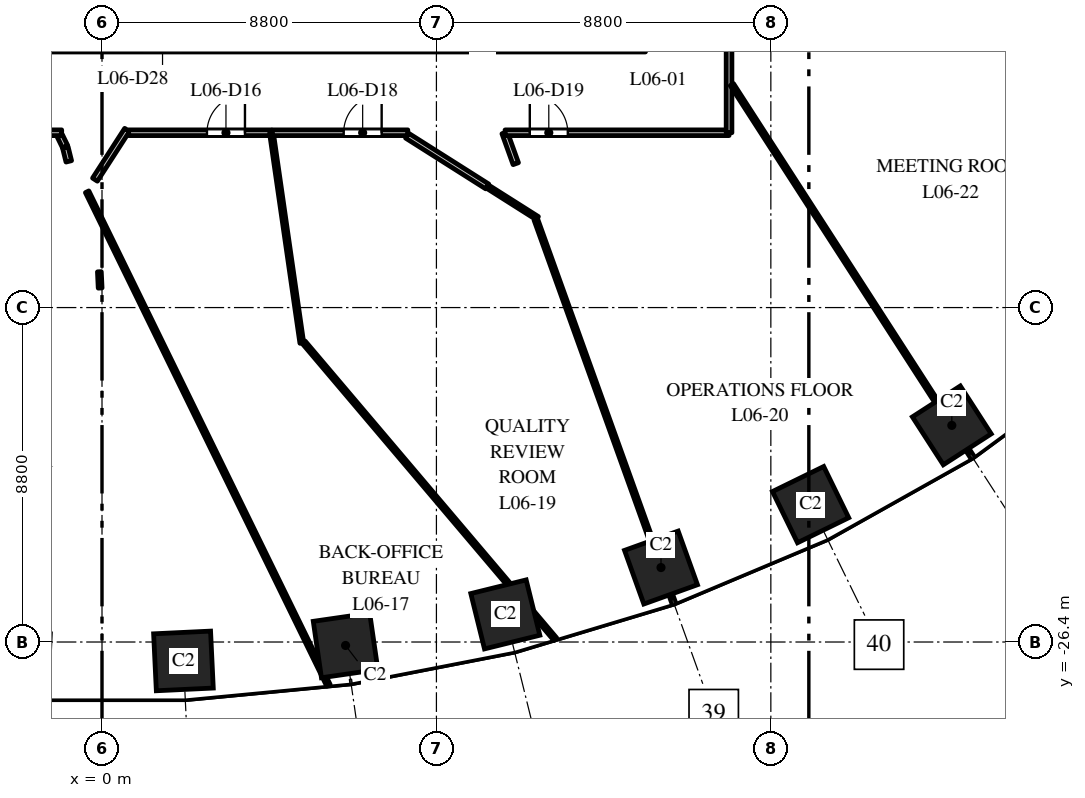
"""IFC4 building model, lengths in metres.
Left out: names, types, materials, properties, quantities, classifications, styles, units other than length and angle.
Written with IfcOpenShell. Run it as: python <this file> out.ifc"""

import sys

from ifc_helpers import new_model, si_unit, direction, frame, frame_2d, origin, origin_2d, place, context, subcontext, project, spatial, rectangle, extrude, element, fill, save


model = new_model("IFC4")
c1 = context("Model", 3, precision=1e-05, world=origin(), true_north=direction((0.0, 1.0)))
c2 = subcontext(c1, "Body", "Model", "MODEL_VIEW")
j1 = project(units=[si_unit("LENGTHUNIT", "METRE"), si_unit("PLANEANGLEUNIT", "RADIAN")], contexts=[c1])
p1 = place(None, origin())
s1 = spatial("IfcSite", under=j1, at=p1, CompositionType="ELEMENT")
p2 = place(p1, origin())
s2 = spatial("IfcBuilding", under=s1, at=p2, CompositionType="ELEMENT")
p3 = place(p2, frame((0.0, 0.0, 34.5)))
s3 = spatial("IfcBuildingStorey", under=s2, at=p3, CompositionType="ELEMENT", Elevation=34.5)
for number, where, z_axis, x_axis in (
    (1, (2.143, -26.898, 0.0), (0.0, 0.0, 1.0), (0.999, 0.048, 0.0)),
    (2, (6.409, -26.491, 0.0), (0.0, 0.0, 1.0), (0.99, 0.143, 0.0)),
    (3, (10.613, -25.674, 0.0), (0.0, 0.0, 1.0), (0.971, 0.24, 0.0)),
    (4, (14.709, -24.441, 0.0), (0.0, 0.0, 1.0), (0.941, 0.338, 0.0)),
    (5, (18.646, -22.785, 0.0), (0.0, 0.0, 1.0), (0.898, 0.439, 0.0)),
    (6, (22.362, -20.7, 0.0), (0.0, 0.0, 1.0), (0.84, 0.542, 0.0)),
):
    element("IfcColumn", number, at=place(p3, frame(where, z_axis=z_axis, x_axis=x_axis)), inside=s3, PredefinedType="COLUMN", context=c2, shape_type="SweptSolid", body=[
        extrude(rectangle(XDim=1.5, YDim=1.5, at=origin_2d()), origin(), (0.0, 0.0, 1.0), 4.0),
    ])
p4 = place(p3, frame((-14.3, -10.8, 0.0), z_axis=(0.0, 0.0, 1.0), x_axis=(1.0, 0.0, 0.0)))
e7 = element("IfcWall", 7, at=p4, inside=s3, PredefinedType="PARTITIONING", context=c2, shape_type="SweptSolid", body=[
    extrude(rectangle(XDim=28.6, YDim=0.15, at=frame_2d((14.3, 0.0))), origin(), (0.0, 0.0, 1.0), 2.85),
])
p5 = place(p4, frame((10.627, 0.0, 0.0)))
e8 = element("IfcOpeningElement", 8, at=p5, cuts=e7, PredefinedType="OPENING", context=c2, shape_type="SweptSolid", body=[
    extrude(rectangle(XDim=1.0, YDim=2.1, at=frame_2d((0.5, 1.05))), frame((0.0, 0.085, 0.0), z_axis=(0.0, -1.0, 0.0), x_axis=(1.0, 0.0, 0.0)), (0.0, 0.0, 1.0), 0.17),
])
p6 = place(p4, frame((15.393, 0.0, 0.0)))
e9 = element("IfcOpeningElement", 9, at=p6, cuts=e7, PredefinedType="OPENING", context=c2, shape_type="SweptSolid", body=[
    extrude(rectangle(XDim=1.0, YDim=2.1, at=frame_2d((0.5, 1.05))), frame((0.0, 0.085, 0.0), z_axis=(0.0, -1.0, 0.0), x_axis=(1.0, 0.0, 0.0)), (0.0, 0.0, 1.0), 0.17),
])
p7 = place(p3, frame((-7.483, -13.0, 0.0), z_axis=(0.0, 0.0, 1.0), x_axis=(1.0, 0.0, 0.0)))
e10 = element("IfcWall", 10, at=p7, inside=s3, PredefinedType="PARTITIONING", context=c2, shape_type="SweptSolid", body=[
    extrude(rectangle(XDim=6.422, YDim=0.15, at=frame_2d((3.211, 0.0))), origin(), (0.0, 0.0, 1.0), 2.85),
])
p8 = place(p7, frame((0.634, 0.0, 0.0)))
e11 = element("IfcOpeningElement", 11, at=p8, cuts=e10, PredefinedType="OPENING", context=c2, shape_type="SweptSolid", body=[
    extrude(rectangle(XDim=1.0, YDim=2.1, at=frame_2d((0.5, 1.05))), frame((0.0, 0.085, 0.0), z_axis=(0.0, -1.0, 0.0), x_axis=(1.0, 0.0, 0.0)), (0.0, 0.0, 1.0), 0.17),
])
p9 = place(p3, frame((-1.111, -13.079, 0.0), z_axis=(0.0, 0.0, 1.0), x_axis=(0.440240923942, -0.897879685084, 0.0)))
e12 = element("IfcWall", 12, at=p9, inside=s3, PredefinedType="PARTITIONING", context=c2, shape_type="SweptSolid", body=[
    extrude(rectangle(XDim=0.323, YDim=0.15, at=frame_2d((0.161, 0.0))), origin(), (0.0, 0.0, 1.0), 2.85),
])
p10 = place(p3, frame((-0.965, -13.386, 0.0), z_axis=(0.0, 0.0, 1.0), x_axis=(0.240863917947, -0.97055889725, 0.0)))
e13 = element("IfcWall", 13, at=p10, inside=s3, PredefinedType="PARTITIONING", context=c2, shape_type="SweptSolid", body=[
    extrude(rectangle(XDim=0.378, YDim=0.15, at=frame_2d((0.189, 0.0))), origin(), (0.0, 0.0, 1.0), 2.85),
])
p11 = place(p3, frame((-0.391, -14.553, 0.0), z_axis=(0.0, 0.0, 1.0), x_axis=(0.439257390119, -0.898361255412, 0.0)))
e14 = element("IfcWall", 14, at=p11, inside=s3, PredefinedType="PARTITIONING", context=c2, shape_type="SweptSolid", body=[
    extrude(rectangle(XDim=14.454, YDim=0.1, at=frame_2d((7.227, 0.0))), origin(), (0.0, 0.0, 1.0), 2.85),
])
p12 = place(p3, frame((-0.185, -14.234, 0.0), z_axis=(0.0, 0.0, 1.0), x_axis=(0.542380278774, 0.840133104452, 0.0)))
e15 = element("IfcWall", 15, at=p12, inside=s3, PredefinedType="PARTITIONING", context=c2, shape_type="SweptSolid", body=[
    extrude(rectangle(XDim=1.558, YDim=0.15, at=frame_2d((0.779, 0.0))), origin(), (0.0, 0.0, 1.0), 3.7),
])
p13 = place(p3, frame((-0.069, -16.658, 0.0), z_axis=(0.0, 0.0, 1.0), x_axis=(0.046725861685, -0.99890775042, 0.0)))
e16 = element("IfcWall", 16, at=p13, inside=s3, PredefinedType="PARTITIONING", context=c2, shape_type="SweptSolid", body=[
    extrude(rectangle(XDim=0.428, YDim=0.1, at=frame_2d((0.214, 0.0))), origin(), (0.0, 0.0, 1.0), 3.7),
])
p14 = place(p3, frame((0.701, -13.0, 0.0), z_axis=(0.0, 0.0, 1.0), x_axis=(1.0, 0.0, 0.0)))
e17 = element("IfcWall", 17, at=p14, inside=s3, PredefinedType="PARTITIONING", context=c2, shape_type="SweptSolid", body=[
    extrude(rectangle(XDim=3.758, YDim=0.15, at=frame_2d((1.879, 0.0))), origin(), (0.0, 0.0, 1.0), 2.85),
])
p15 = place(p14, frame((2.061, 0.0, 0.0)))
e18 = element("IfcOpeningElement", 18, at=p15, cuts=e17, PredefinedType="OPENING", context=c2, shape_type="SweptSolid", body=[
    extrude(rectangle(XDim=1.0, YDim=2.1, at=frame_2d((0.5, 1.05))), frame((0.0, 0.085, 0.0), z_axis=(0.0, -1.0, 0.0), x_axis=(1.0, 0.0, 0.0)), (0.0, 0.0, 1.0), 0.17),
])
p16 = place(p3, frame((4.459, -13.004, 0.0), z_axis=(0.0, 0.0, 1.0), x_axis=(0.143036391033, -0.989717429795, 0.0)))
e19 = element("IfcWall", 19, at=p16, inside=s3, PredefinedType="PARTITIONING", context=c2, shape_type="SweptSolid", body=[
    extrude(rectangle(XDim=5.586, YDim=0.1, at=frame_2d((2.793, 0.0))), origin(), (0.0, 0.0, 1.0), 3.7),
])
p17 = place(p3, frame((4.479, -13.0, 0.0), z_axis=(0.0, 0.0, 1.0), x_axis=(1.0, 0.0, 0.0)))
e20 = element("IfcWall", 20, at=p17, inside=s3, PredefinedType="PARTITIONING", context=c2, shape_type="SweptSolid", body=[
    extrude(rectangle(XDim=3.568, YDim=0.15, at=frame_2d((1.784, 0.0))), origin(), (0.0, 0.0, 1.0), 2.85),
])
p18 = place(p17, frame((1.88, 0.0, 0.0)))
e21 = element("IfcOpeningElement", 21, at=p18, cuts=e20, PredefinedType="OPENING", context=c2, shape_type="SweptSolid", body=[
    extrude(rectangle(XDim=1.0, YDim=2.1, at=frame_2d((0.5, 1.05))), frame((0.0, 0.085, 0.0), z_axis=(0.0, -1.0, 0.0), x_axis=(1.0, 0.0, 0.0)), (0.0, 0.0, 1.0), 0.17),
])
p19 = place(p3, frame((5.306, -18.512, 0.0), z_axis=(0.0, 0.0, 1.0), x_axis=(0.646500054355, -0.762913939917, 0.0)))
e22 = element("IfcWall", 22, at=p19, inside=s3, PredefinedType="PARTITIONING", context=c2, shape_type="SweptSolid", body=[
    extrude(rectangle(XDim=10.239, YDim=0.1, at=frame_2d((5.119, 0.0))), origin(), (0.0, 0.0, 1.0), 2.85),
])
p20 = place(p3, frame((8.028, -13.077, 0.0), z_axis=(0.0, 0.0, 1.0), x_axis=(0.844718865656, -0.53521027457, 0.0)))
e23 = element("IfcWall", 23, at=p20, inside=s3, PredefinedType="PARTITIONING", context=c2, shape_type="SweptSolid", body=[
    extrude(rectangle(XDim=2.497, YDim=0.15, at=frame_2d((1.248, 0.0))), origin(), (0.0, 0.0, 1.0), 3.7),
])
p21 = place(p3, frame((10.137, -14.413, 0.0), z_axis=(0.0, 0.0, 1.0), x_axis=(0.844849680057, -0.535003755228, 0.0)))
e24 = element("IfcWall", 24, at=p21, inside=s3, PredefinedType="PARTITIONING", context=c2, shape_type="SweptSolid", body=[
    extrude(rectangle(XDim=1.562, YDim=0.1, at=frame_2d((0.781, 0.0))), origin(), (0.0, 0.0, 1.0), 3.7),
])
p22 = place(p3, frame((10.595, -13.0, 0.0), z_axis=(0.0, 0.0, 1.0), x_axis=(0.338659506624, -0.940908995904, 0.0)))
e25 = element("IfcWall", 25, at=p22, inside=s3, PredefinedType="PARTITIONING", context=c2, shape_type="SweptSolid", body=[
    extrude(rectangle(XDim=0.865, YDim=0.15, at=frame_2d((0.433, 0.0))), origin(), (0.0, 0.0, 1.0), 3.7),
])
p23 = place(p3, frame((10.607, -13.0, 0.0), z_axis=(0.0, 0.0, 1.0), x_axis=(1.0, 0.0, 0.0)))
e26 = element("IfcWall", 26, at=p23, inside=s3, PredefinedType="PARTITIONING", context=c2, shape_type="SweptSolid", body=[
    extrude(rectangle(XDim=5.893, YDim=0.15, at=frame_2d((2.947, 0.0))), origin(), (0.0, 0.0, 1.0), 3.7),
])
p24 = place(p23, frame((0.65, 0.0, 0.0)))
e27 = element("IfcOpeningElement", 27, at=p24, cuts=e26, PredefinedType="OPENING", context=c2, shape_type="SweptSolid", body=[
    extrude(rectangle(XDim=1.0, YDim=2.1, at=frame_2d((0.5, 1.05))), frame((0.0, 0.085, 0.0), z_axis=(0.0, -1.0, 0.0), x_axis=(1.0, 0.0, 0.0)), (0.0, 0.0, 1.0), 0.17),
])
p25 = place(p3, frame((11.416, -15.282, 0.0), z_axis=(0.0, 0.0, 1.0), x_axis=(0.338364268616, -0.94101520802, 0.0)))
e28 = element("IfcWall", 28, at=p25, inside=s3, PredefinedType="PARTITIONING", context=c2, shape_type="SweptSolid", body=[
    extrude(rectangle(XDim=10.734, YDim=0.1, at=frame_2d((5.367, 0.0))), origin(), (0.0, 0.0, 1.0), 3.7),
])
p26 = place(p3, frame((16.5, -13.0, 0.0), z_axis=(0.0, 0.0, 1.0), x_axis=(0.0, 1.0, 0.0)))
e29 = element("IfcWall", 29, at=p26, inside=s3, PredefinedType="PARTITIONING", context=c2, shape_type="SweptSolid", body=[
    extrude(rectangle(XDim=2.3, YDim=0.15, at=frame_2d((1.15, 0.0))), origin(), (0.0, 0.0, 1.0), 3.7),
])
p27 = place(p3, frame((16.575, -11.733, 0.0), z_axis=(0.0, 0.0, 1.0), x_axis=(0.54222594427, -0.840232720953, 0.0)))
e30 = element("IfcWall", 30, at=p27, inside=s3, PredefinedType="PARTITIONING", context=c2, shape_type="SweptSolid", body=[
    extrude(rectangle(XDim=11.674, YDim=0.1, at=frame_2d((5.837, 0.0))), origin(), (0.0, 0.0, 1.0), 3.7),
])
p28 = place(p15, origin())
e31 = element("IfcDoor", 31, at=p28, inside=s3, OperationType="SINGLE_SWING_RIGHT", PredefinedType="DOOR", context=c2, shape_type="SweptSolid", body=[
    extrude(rectangle(XDim=1.0, YDim=2.1, at=frame_2d((0.5, 1.05))), frame((0.0, 0.025, 0.0), z_axis=(0.0, -1.0, 0.0), x_axis=(1.0, 0.0, 0.0)), (0.0, 0.0, 1.0), 0.05),
])
fill(e18, e31)
p29 = place(p18, origin())
e32 = element("IfcDoor", 32, at=p29, inside=s3, OperationType="SINGLE_SWING_RIGHT", PredefinedType="DOOR", context=c2, shape_type="SweptSolid", body=[
    extrude(rectangle(XDim=1.0, YDim=2.1, at=frame_2d((0.5, 1.05))), frame((0.0, 0.025, 0.0), z_axis=(0.0, -1.0, 0.0), x_axis=(1.0, 0.0, 0.0)), (0.0, 0.0, 1.0), 0.05),
])
fill(e21, e32)
p30 = place(p24, origin())
e33 = element("IfcDoor", 33, at=p30, inside=s3, OperationType="SINGLE_SWING_LEFT", PredefinedType="DOOR", context=c2, shape_type="SweptSolid", body=[
    extrude(rectangle(XDim=1.0, YDim=2.1, at=frame_2d((0.5, 1.05))), frame((0.0, 0.025, 0.0), z_axis=(0.0, -1.0, 0.0), x_axis=(1.0, 0.0, 0.0)), (0.0, 0.0, 1.0), 0.05),
])
fill(e27, e33)
save(model, sys.argv[1])
